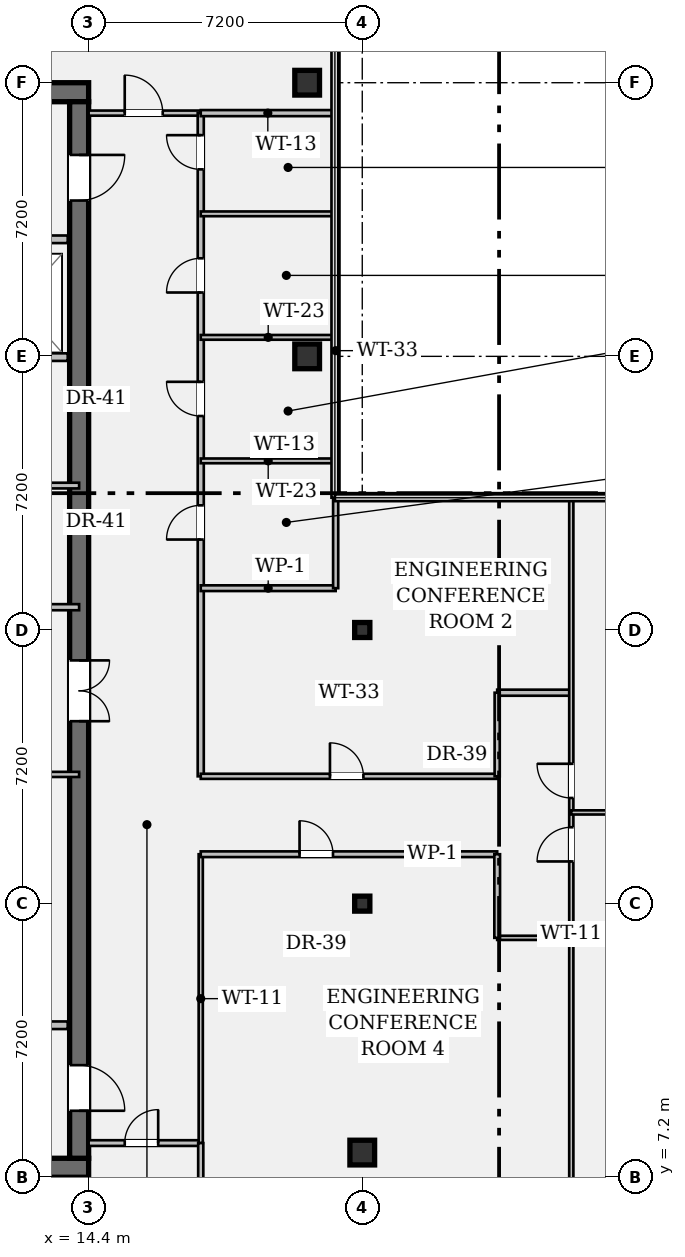
"""IFC4 building model, lengths in metres.
Left out: names, types, materials, properties, quantities, classifications, styles, units other than length and angle.
Written with IfcOpenShell. Run it as: python <this file> out.ifc"""

import sys

from ifc_helpers import new_model, si_unit, direction, frame, frame_2d, origin, origin_2d, place, context, subcontext, project, spatial, rectangle, hollow_rectangle, i_section, extrude, element, fill, save


model = new_model("IFC4")
c1 = context("Model", 3, precision=1e-05, world=origin(), true_north=direction((0.0, 1.0)))
c2 = subcontext(c1, "Body", "Model", "MODEL_VIEW")
j1 = project(units=[si_unit("LENGTHUNIT", "METRE"), si_unit("PLANEANGLEUNIT", "RADIAN")], contexts=[c1])
p1 = place(None, origin())
s1 = spatial("IfcSite", under=j1, at=p1, CompositionType="ELEMENT")
p2 = place(p1, origin())
s2 = spatial("IfcBuilding", under=s1, at=p2, CompositionType="ELEMENT")
p3 = place(p2, frame((0.0, 0.0, 283.15)))
s3 = spatial("IfcBuildingStorey", under=s2, at=p3, CompositionType="ELEMENT", Elevation=283.15)
for number, where, z_axis, x_axis in (
    (1, (0.5, 7.45, 0.0), (0.0, 0.0, 1.0), (1.0, 0.0, 0.0)),
    (2, (0.5, 35.75, 0.0), (0.0, 0.0, 1.0), (1.0, 0.0, 0.0)),
):
    element("IfcWall", number, at=place(p3, frame(where, z_axis=z_axis, x_axis=x_axis)), inside=s3, PredefinedType="SHEAR", context=c2, shape_type="SweptSolid", body=[
        extrude(rectangle(XDim=13.9, YDim=0.5, at=frame_2d((6.95, 0.0))), origin(), (0.0, 0.0, 1.0), 3.24),
    ])
p4 = place(p3, frame((14.15, 35.5, 0.0), z_axis=(0.0, 0.0, 1.0), x_axis=(0.0, -1.0, 0.0)))
e3 = element("IfcWall", 3, at=p4, inside=s3, PredefinedType="SHEAR", context=c2, shape_type="SweptSolid", body=[
    extrude(rectangle(XDim=27.8, YDim=0.5, at=frame_2d((13.9, 0.0))), origin(), (0.0, 0.0, 1.0), 3.24),
])
p5 = place(p4, frame((1.4, 0.0, 0.0)))
e4 = element("IfcOpeningElement", 4, at=p5, cuts=e3, PredefinedType="OPENING", context=c2, shape_type="SweptSolid", body=[
    extrude(rectangle(XDim=1.2, YDim=2.15, at=frame_2d((0.6, 1.075))), frame((0.0, 0.262, 0.0), z_axis=(0.0, -1.0, 0.0), x_axis=(1.0, 0.0, 0.0)), (0.0, 0.0, 1.0), 0.524),
])
p6 = place(p4, frame((25.35, 0.0, 0.0)))
e5 = element("IfcOpeningElement", 5, at=p6, cuts=e3, PredefinedType="OPENING", context=c2, shape_type="SweptSolid", body=[
    extrude(rectangle(XDim=1.2, YDim=2.15, at=frame_2d((0.6, 1.075))), frame((0.0, 0.262, 0.0), z_axis=(0.0, -1.0, 0.0), x_axis=(1.0, 0.0, 0.0)), (0.0, 0.0, 1.0), 0.524),
])
p7 = place(p4, frame((14.7, 0.0, 0.0)))
e6 = element("IfcOpeningElement", 6, at=p7, cuts=e3, PredefinedType="OPENING", context=c2, shape_type="SweptSolid", body=[
    extrude(rectangle(XDim=1.6, YDim=2.2, at=frame_2d((0.8, 1.1))), frame((0.0, 0.262, 0.0), z_axis=(0.0, -1.0, 0.0), x_axis=(1.0, 0.0, 0.0)), (0.0, 0.0, 1.0), 0.524),
])
for number, where, z_axis, x_axis in (
    (7, (20.15, 28.8, 0.0), (0.0, 0.0, 1.0), (1.0, 0.0, 0.0)),
    (8, (20.15, 36.0, 0.0), (0.0, 0.0, 1.0), (1.0, 0.0, 0.0)),
    (9, (21.6, 7.85, 0.0), (0.0, 0.0, 1.0), (1.0, 0.0, 0.0)),
):
    element("IfcColumn", number, at=place(p3, frame(where, z_axis=z_axis, x_axis=x_axis)), inside=s3, PredefinedType="COLUMN", context=c2, shape_type="SweptSolid", body=[
        extrude(hollow_rectangle(XDim=0.65, YDim=0.65, WallThickness=0.04, at=origin_2d()), origin(), (0.0, 0.0, 1.0), 3.24),
    ])
for number, where, z_axis, x_axis in (
    (10, (21.6, 14.4, 0.0), (0.0, 0.0, 1.0), (1.0, 0.0, 0.0)),
    (11, (21.6, 21.6, 0.0), (0.0, 0.0, 1.0), (1.0, 0.0, 0.0)),
):
    element("IfcColumn", number, at=place(p3, frame(where, z_axis=z_axis, x_axis=x_axis)), inside=s3, PredefinedType="COLUMN", context=c2, shape_type="SweptSolid", body=[
        extrude(i_section(OverallWidth=0.399, OverallDepth=0.394, WebThickness=0.023, FlangeThickness=0.037, FilletRadius=0.018, at=origin_2d()), origin(), (0.0, 0.0, 1.0), 3.24),
    ])
p8 = place(p3, frame((8.7, 31.88, 0.0), z_axis=(0.0, 0.0, 1.0), x_axis=(1.0, 0.0, 0.0)))
e12 = element("IfcWall", 12, at=p8, inside=s3, PredefinedType="PARTITIONING", context=c2, shape_type="SweptSolid", body=[
    extrude(rectangle(XDim=5.15, YDim=0.2, at=frame_2d((2.575, 0.0))), origin(), (0.0, 0.0, 1.0), 3.24),
])
p9 = place(p8, frame((0.75, 0.0, 0.0)))
e13 = element("IfcOpeningElement", 13, at=p9, cuts=e12, PredefinedType="OPENING", context=c2, shape_type="SweptSolid", body=[
    extrude(rectangle(XDim=1.2, YDim=2.2, at=frame_2d((0.6, 1.1))), frame((0.0, 0.112, 0.0), z_axis=(0.0, -1.0, 0.0), x_axis=(1.0, 0.0, 0.0)), (0.0, 0.0, 1.0), 0.224),
])
p10 = place(p8, frame((3.25, 0.0, 0.0)))
e14 = element("IfcOpeningElement", 14, at=p10, cuts=e12, PredefinedType="OPENING", context=c2, shape_type="SweptSolid", body=[
    extrude(rectangle(XDim=1.2, YDim=2.2, at=frame_2d((0.6, 1.1))), frame((0.0, 0.112, 0.0), z_axis=(0.0, -1.0, 0.0), x_axis=(1.0, 0.0, 0.0)), (0.0, 0.0, 1.0), 0.224),
])
for number, where, z_axis, x_axis in (
    (15, (8.7, 11.2, 0.0), (0.0, 0.0, 1.0), (1.0, 0.0, 0.0)),
    (16, (8.7, 28.78, 0.0), (0.0, 0.0, 1.0), (1.0, 0.0, 0.0)),
):
    element("IfcWall", number, at=place(p3, frame(where, z_axis=z_axis, x_axis=x_axis)), inside=s3, PredefinedType="PARTITIONING", context=c2, shape_type="SweptSolid", body=[
        extrude(rectangle(XDim=5.15, YDim=0.2, at=frame_2d((2.575, 0.0))), origin(), (0.0, 0.0, 1.0), 3.24),
    ])
p11 = place(p3, frame((7.1, 22.2, 0.0), z_axis=(0.0, 0.0, 1.0), x_axis=(1.0, 0.0, 0.0)))
e17 = element("IfcWall", 17, at=p11, inside=s3, PredefinedType="PARTITIONING", context=c2, shape_type="SweptSolid", body=[
    extrude(rectangle(XDim=7.05, YDim=0.16, at=frame_2d((3.525, 0.0))), origin(), (0.0, 0.0, 1.0), 3.24),
])
p12 = place(p3, frame((7.1, 25.4, 0.0), z_axis=(0.0, 0.0, 1.0), x_axis=(1.0, 0.0, 0.0)))
e18 = element("IfcWall", 18, at=p12, inside=s3, PredefinedType="PARTITIONING", context=c2, shape_type="SweptSolid", body=[
    extrude(rectangle(XDim=7.05, YDim=0.15, at=frame_2d((3.525, 0.0))), origin(), (0.0, 0.0, 1.0), 3.24),
])
p13 = place(p3, frame((5.15, 17.8, 0.0), z_axis=(0.0, 0.0, 1.0), x_axis=(1.0, 0.0, 0.0)))
e19 = element("IfcWall", 19, at=p13, inside=s3, PredefinedType="PARTITIONING", context=c2, shape_type="SweptSolid", body=[
    extrude(rectangle(XDim=9.0, YDim=0.135, at=frame_2d((4.5, 0.0))), origin(), (0.0, 0.0, 1.0), 3.24),
])
p14 = place(p13, frame((4.35, 0.0, 0.0)))
e20 = element("IfcOpeningElement", 20, at=p14, cuts=e19, PredefinedType="OPENING", context=c2, shape_type="SweptSolid", body=[
    extrude(rectangle(XDim=1.0, YDim=2.15, at=frame_2d((0.5, 1.075))), frame((0.0, 0.08, 0.0), z_axis=(0.0, -1.0, 0.0), x_axis=(1.0, 0.0, 0.0)), (0.0, 0.0, 1.0), 0.159),
])
p15 = place(p3, frame((14.4, 8.1, 0.0), z_axis=(0.0, 0.0, 1.0), x_axis=(1.0, 0.0, 0.0)))
e21 = element("IfcWall", 21, at=p15, inside=s3, PredefinedType="PARTITIONING", context=c2, shape_type="SweptSolid", body=[
    extrude(rectangle(XDim=2.95, YDim=0.15, at=frame_2d((1.475, 0.0))), origin(), (0.0, 0.0, 1.0), 3.24),
])
p16 = place(p15, frame((0.95, 0.0, 0.0)))
e22 = element("IfcOpeningElement", 22, at=p16, cuts=e21, PredefinedType="OPENING", context=c2, shape_type="SweptSolid", body=[
    extrude(rectangle(XDim=0.88, YDim=2.15, at=frame_2d((0.44, 1.075))), frame((0.0, 0.087, 0.0), z_axis=(0.0, -1.0, 0.0), x_axis=(1.0, 0.0, 0.0)), (0.0, 0.0, 1.0), 0.174),
])
p17 = place(p3, frame((14.4, 35.2, 0.0), z_axis=(0.0, 0.0, 1.0), x_axis=(1.0, 0.0, 0.0)))
e23 = element("IfcWall", 23, at=p17, inside=s3, PredefinedType="PARTITIONING", context=c2, shape_type="SweptSolid", body=[
    extrude(rectangle(XDim=2.95, YDim=0.135, at=frame_2d((1.475, 0.0))), origin(), (0.0, 0.0, 1.0), 2.808),
])
p18 = place(p17, frame((0.95, 0.0, 0.0)))
e24 = element("IfcOpeningElement", 24, at=p18, cuts=e23, PredefinedType="OPENING", context=c2, shape_type="SweptSolid", body=[
    extrude(rectangle(XDim=1.0, YDim=2.15, at=frame_2d((0.5, 1.075))), frame((0.0, 0.08, 0.0), z_axis=(0.0, -1.0, 0.0), x_axis=(1.0, 0.0, 0.0)), (0.0, 0.0, 1.0), 0.159),
])
p19 = place(p3, frame((17.35, 8.1, 0.0), z_axis=(0.0, 0.0, 1.0), x_axis=(0.0, 1.0, 0.0)))
e25 = element("IfcWall", 25, at=p19, inside=s3, PredefinedType="PARTITIONING", context=c2, shape_type="SweptSolid", body=[
    extrude(rectangle(XDim=7.6, YDim=0.11, at=frame_2d((3.8, 0.0))), origin(), (0.0, 0.0, 1.0), 2.676),
])
p20 = place(p3, frame((17.35, 17.75, 0.0), z_axis=(0.0, 0.0, 1.0), x_axis=(0.0, 1.0, 0.0)))
e26 = element("IfcWall", 26, at=p20, inside=s3, PredefinedType="PARTITIONING", context=c2, shape_type="SweptSolid", body=[
    extrude(rectangle(XDim=17.45, YDim=0.16, at=frame_2d((8.725, 0.0))), origin(), (0.0, 0.0, 1.0), 2.676),
])
p21 = place(p20, frame((6.23, 0.0, 0.0)))
e27 = element("IfcOpeningElement", 27, at=p21, cuts=e26, PredefinedType="OPENING", context=c2, shape_type="SweptSolid", body=[
    extrude(rectangle(XDim=0.9, YDim=2.15, at=frame_2d((0.45, 1.075))), frame((0.0, 0.092, 0.0), z_axis=(0.0, -1.0, 0.0), x_axis=(1.0, 0.0, 0.0)), (0.0, 0.0, 1.0), 0.184),
])
p22 = place(p20, frame((9.48, 0.0, 0.0)))
e28 = element("IfcOpeningElement", 28, at=p22, cuts=e26, PredefinedType="OPENING", context=c2, shape_type="SweptSolid", body=[
    extrude(rectangle(XDim=0.9, YDim=2.15, at=frame_2d((0.45, 1.075))), frame((0.0, 0.092, 0.0), z_axis=(0.0, -1.0, 0.0), x_axis=(1.0, 0.0, 0.0)), (0.0, 0.0, 1.0), 0.184),
])
p23 = place(p20, frame((12.73, 0.0, 0.0)))
e29 = element("IfcOpeningElement", 29, at=p23, cuts=e26, PredefinedType="OPENING", context=c2, shape_type="SweptSolid", body=[
    extrude(rectangle(XDim=0.9, YDim=2.15, at=frame_2d((0.45, 1.075))), frame((0.0, 0.092, 0.0), z_axis=(0.0, -1.0, 0.0), x_axis=(1.0, 0.0, 0.0)), (0.0, 0.0, 1.0), 0.184),
])
p24 = place(p20, frame((15.97, 0.0, 0.0)))
e30 = element("IfcOpeningElement", 30, at=p24, cuts=e26, PredefinedType="OPENING", context=c2, shape_type="SweptSolid", body=[
    extrude(rectangle(XDim=0.9, YDim=2.15, at=frame_2d((0.45, 1.075))), frame((0.0, 0.092, 0.0), z_axis=(0.0, -1.0, 0.0), x_axis=(1.0, 0.0, 0.0)), (0.0, 0.0, 1.0), 0.184),
])
p25 = place(p3, frame((17.35, 15.7, 0.0), z_axis=(0.0, 0.0, 1.0), x_axis=(1.0, 0.0, 0.0)))
e31 = element("IfcWall", 31, at=p25, inside=s3, PredefinedType="PARTITIONING", context=c2, shape_type="SweptSolid", body=[
    extrude(rectangle(XDim=7.8, YDim=0.15, at=frame_2d((3.9, 0.0))), origin(), (0.0, 0.0, 1.0), 2.676),
])
p26 = place(p25, frame((2.6, 0.0, 0.0)))
e32 = element("IfcOpeningElement", 32, at=p26, cuts=e31, PredefinedType="OPENING", context=c2, shape_type="SweptSolid", body=[
    extrude(rectangle(XDim=0.88, YDim=2.15, at=frame_2d((0.44, 1.075))), frame((0.0, 0.087, 0.0), z_axis=(0.0, -1.0, 0.0), x_axis=(1.0, 0.0, 0.0)), (0.0, 0.0, 1.0), 0.174),
])
p27 = place(p3, frame((17.35, 17.75, 0.0), z_axis=(0.0, 0.0, 1.0), x_axis=(1.0, 0.0, 0.0)))
e33 = element("IfcWall", 33, at=p27, inside=s3, PredefinedType="PARTITIONING", context=c2, shape_type="SweptSolid", body=[
    extrude(rectangle(XDim=7.8, YDim=0.135, at=frame_2d((3.9, 0.0))), origin(), (0.0, 0.0, 1.0), 2.676),
])
p28 = place(p27, frame((3.4, 0.0, 0.0)))
e34 = element("IfcOpeningElement", 34, at=p28, cuts=e33, PredefinedType="OPENING", context=c2, shape_type="SweptSolid", body=[
    extrude(rectangle(XDim=0.88, YDim=2.15, at=frame_2d((0.44, 1.075))), frame((0.0, 0.08, 0.0), z_axis=(0.0, -1.0, 0.0), x_axis=(1.0, 0.0, 0.0)), (0.0, 0.0, 1.0), 0.159),
])
p29 = place(p3, frame((25.15, 13.5, 0.0), z_axis=(0.0, 0.0, 1.0), x_axis=(1.0, 0.0, 0.0)))
e35 = element("IfcWall", 35, at=p29, inside=s3, PredefinedType="PARTITIONING", context=c2, shape_type="SweptSolid", body=[
    extrude(rectangle(XDim=1.95, YDim=0.11, at=frame_2d((0.975, 0.0))), origin(), (0.0, 0.0, 1.0), 2.808),
])
p30 = place(p3, frame((25.15, 19.95, 0.0), z_axis=(0.0, 0.0, 1.0), x_axis=(1.0, 0.0, 0.0)))
e36 = element("IfcWall", 36, at=p30, inside=s3, PredefinedType="PARTITIONING", context=c2, shape_type="SweptSolid", body=[
    extrude(rectangle(XDim=1.95, YDim=0.16, at=frame_2d((0.975, 0.0))), origin(), (0.0, 0.0, 1.0), 2.808),
])
p31 = place(p3, frame((25.15, 13.5, 0.0), z_axis=(0.0, 0.0, 1.0), x_axis=(0.0, 1.0, 0.0)))
e37 = element("IfcWall", 37, at=p31, inside=s3, PredefinedType="PARTITIONING", context=c2, shape_type="SweptSolid", body=[
    extrude(rectangle(XDim=2.2, YDim=0.15, at=frame_2d((1.1, 0.0))), origin(), (0.0, 0.0, 1.0), 2.676),
])
p32 = place(p3, frame((25.15, 17.75, 0.0), z_axis=(0.0, 0.0, 1.0), x_axis=(0.0, 1.0, 0.0)))
e38 = element("IfcWall", 38, at=p32, inside=s3, PredefinedType="PARTITIONING", context=c2, shape_type="SweptSolid", body=[
    extrude(rectangle(XDim=2.2, YDim=0.135, at=frame_2d((1.1, 0.0))), origin(), (0.0, 0.0, 1.0), 3.24),
])
p33 = place(p3, frame((27.1, 6.52, 0.0), z_axis=(0.0, 0.0, 1.0), x_axis=(0.0, 1.0, 0.0)))
e39 = element("IfcWall", 39, at=p33, inside=s3, PredefinedType="PARTITIONING", context=c2, shape_type="SweptSolid", body=[
    extrude(rectangle(XDim=18.56, YDim=0.11, at=frame_2d((9.28, 0.0))), origin(), (0.0, 0.0, 1.0), 2.676),
])
p34 = place(p33, frame((8.99, 0.0, 0.0)))
e40 = element("IfcOpeningElement", 40, at=p34, cuts=e39, PredefinedType="OPENING", context=c2, shape_type="SweptSolid", body=[
    extrude(rectangle(XDim=0.9, YDim=2.15, at=frame_2d((0.45, 1.075))), frame((0.0, 0.067, 0.0), z_axis=(0.0, -1.0, 0.0), x_axis=(1.0, 0.0, 0.0)), (0.0, 0.0, 1.0), 0.134),
])
p35 = place(p33, frame((10.66, 0.0, 0.0)))
e41 = element("IfcOpeningElement", 41, at=p35, cuts=e39, PredefinedType="OPENING", context=c2, shape_type="SweptSolid", body=[
    extrude(rectangle(XDim=0.9, YDim=2.15, at=frame_2d((0.45, 1.075))), frame((0.0, 0.067, 0.0), z_axis=(0.0, -1.0, 0.0), x_axis=(1.0, 0.0, 0.0)), (0.0, 0.0, 1.0), 0.134),
])
p36 = place(p3, frame((17.35, 35.2, 0.0), z_axis=(0.0, 0.0, 1.0), x_axis=(1.0, 0.0, 0.0)))
e42 = element("IfcWall", 42, at=p36, inside=s3, PredefinedType="PARTITIONING", context=c2, shape_type="SweptSolid", body=[
    extrude(rectangle(XDim=3.53, YDim=0.16, at=frame_2d((1.765, 0.0))), origin(), (0.0, 0.0, 1.0), 2.808),
])
p37 = place(p3, frame((17.35, 22.7, 0.0), z_axis=(0.0, 0.0, 1.0), x_axis=(1.0, 0.0, 0.0)))
e43 = element("IfcWall", 43, at=p37, inside=s3, PredefinedType="PARTITIONING", context=c2, shape_type="SweptSolid", body=[
    extrude(rectangle(XDim=3.55, YDim=0.15, at=frame_2d((1.775, 0.0))), origin(), (0.0, 0.0, 1.0), 2.808),
])
p38 = place(p3, frame((20.9, 22.7, 0.0), z_axis=(0.0, 0.0, 1.0), x_axis=(0.0, 1.0, 0.0)))
e44 = element("IfcWall", 44, at=p38, inside=s3, PredefinedType="PARTITIONING", context=c2, shape_type="SweptSolid", body=[
    extrude(rectangle(XDim=12.5, YDim=0.135, at=frame_2d((6.25, 0.0))), origin(), (0.0, 0.0, 1.0), 3.24),
])
for number, where, z_axis, x_axis in (
    (45, (17.35, 26.05, 0.0), (0.0, 0.0, 1.0), (1.0, 0.0, 0.0)),
    (46, (17.35, 29.3, 0.0), (0.0, 0.0, 1.0), (1.0, 0.0, 0.0)),
    (47, (17.35, 32.55, 0.0), (0.0, 0.0, 1.0), (1.0, 0.0, 0.0)),
):
    element("IfcWall", number, at=place(p3, frame(where, z_axis=z_axis, x_axis=x_axis)), inside=s3, PredefinedType="PARTITIONING", context=c2, shape_type="SweptSolid", body=[
        extrude(rectangle(XDim=3.55, YDim=0.125, at=frame_2d((1.775, 0.0))), origin(), (0.0, 0.0, 1.0), 2.808),
    ])
p39 = place(p3, frame((17.35, 6.52, 0.0), z_axis=(0.0, 0.0, 1.0), x_axis=(0.0, 1.0, 0.0)))
e48 = element("IfcWall", 48, at=p39, inside=s3, PredefinedType="PARTITIONING", context=c2, shape_type="SweptSolid", body=[
    extrude(rectangle(XDim=1.58, YDim=0.135, at=frame_2d((0.79, 0.0))), origin(), (0.0, 0.0, 1.0), 3.24),
])
p40 = place(p3, frame((27.1, 16.8, 0.0), z_axis=(0.0, 0.0, 1.0), x_axis=(1.0, 0.0, 0.0)))
e49 = element("IfcWall", 49, at=p40, inside=s3, PredefinedType="PARTITIONING", context=c2, shape_type="SweptSolid", body=[
    extrude(rectangle(XDim=18.38, YDim=0.11, at=frame_2d((9.19, 0.0))), origin(), (0.0, 0.0, 1.0), 2.676),
])
p41 = place(p5, origin())
e50 = element("IfcDoor", 50, at=p41, inside=s3, OperationType="SINGLE_SWING_LEFT", PredefinedType="DOOR", context=c2, shape_type="SweptSolid", body=[
    extrude(rectangle(XDim=1.2, YDim=2.15, at=frame_2d((0.6, 1.075))), frame((0.0, 0.025, 0.0), z_axis=(0.0, -1.0, 0.0), x_axis=(1.0, 0.0, 0.0)), (0.0, 0.0, 1.0), 0.05),
])
fill(e4, e50)
p42 = place(p6, origin())
e51 = element("IfcDoor", 51, at=p42, inside=s3, OperationType="SINGLE_SWING_RIGHT", PredefinedType="DOOR", context=c2, shape_type="SweptSolid", body=[
    extrude(rectangle(XDim=1.2, YDim=2.15, at=frame_2d((0.6, 1.075))), frame((0.0, 0.025, 0.0), z_axis=(0.0, -1.0, 0.0), x_axis=(1.0, 0.0, 0.0)), (0.0, 0.0, 1.0), 0.05),
])
fill(e5, e51)
p43 = place(p7, origin())
e52 = element("IfcDoor", 52, at=p43, inside=s3, OperationType="DOUBLE_DOOR_SINGLE_SWING", PredefinedType="DOOR", context=c2, shape_type="SweptSolid", body=[
    extrude(rectangle(XDim=1.6, YDim=2.2, at=frame_2d((0.8, 1.1))), frame((0.0, 0.025, 0.0), z_axis=(0.0, -1.0, 0.0), x_axis=(1.0, 0.0, 0.0)), (0.0, 0.0, 1.0), 0.05),
])
fill(e6, e52)
p44 = place(p18, origin())
e53 = element("IfcDoor", 53, at=p44, inside=s3, OperationType="SINGLE_SWING_LEFT", PredefinedType="DOOR", context=c2, shape_type="SweptSolid", body=[
    extrude(rectangle(XDim=1.0, YDim=2.15, at=frame_2d((0.5, 1.075))), frame((0.0, 0.025, 0.0), z_axis=(0.0, -1.0, 0.0), x_axis=(1.0, 0.0, 0.0)), (0.0, 0.0, 1.0), 0.05),
])
fill(e24, e53)
p45 = place(p21, origin())
e54 = element("IfcDoor", 54, at=p45, inside=s3, OperationType="SINGLE_SWING_LEFT", PredefinedType="DOOR", context=c2, shape_type="SweptSolid", body=[
    extrude(rectangle(XDim=0.9, YDim=2.15, at=frame_2d((0.45, 1.075))), frame((0.0, 0.025, 0.0), z_axis=(0.0, -1.0, 0.0), x_axis=(1.0, 0.0, 0.0)), (0.0, 0.0, 1.0), 0.05),
])
fill(e27, e54)
p46 = place(p22, origin())
e55 = element("IfcDoor", 55, at=p46, inside=s3, OperationType="SINGLE_SWING_RIGHT", PredefinedType="DOOR", context=c2, shape_type="SweptSolid", body=[
    extrude(rectangle(XDim=0.9, YDim=2.15, at=frame_2d((0.45, 1.075))), frame((0.0, 0.025, 0.0), z_axis=(0.0, -1.0, 0.0), x_axis=(1.0, 0.0, 0.0)), (0.0, 0.0, 1.0), 0.05),
])
fill(e28, e55)
p47 = place(p23, origin())
e56 = element("IfcDoor", 56, at=p47, inside=s3, OperationType="SINGLE_SWING_LEFT", PredefinedType="DOOR", context=c2, shape_type="SweptSolid", body=[
    extrude(rectangle(XDim=0.9, YDim=2.15, at=frame_2d((0.45, 1.075))), frame((0.0, 0.025, 0.0), z_axis=(0.0, -1.0, 0.0), x_axis=(1.0, 0.0, 0.0)), (0.0, 0.0, 1.0), 0.05),
])
fill(e29, e56)
p48 = place(p24, origin())
e57 = element("IfcDoor", 57, at=p48, inside=s3, OperationType="SINGLE_SWING_RIGHT", PredefinedType="DOOR", context=c2, shape_type="SweptSolid", body=[
    extrude(rectangle(XDim=0.9, YDim=2.15, at=frame_2d((0.45, 1.075))), frame((0.0, 0.025, 0.0), z_axis=(0.0, -1.0, 0.0), x_axis=(1.0, 0.0, 0.0)), (0.0, 0.0, 1.0), 0.05),
])
fill(e30, e57)
p49 = place(p28, origin())
e58 = element("IfcDoor", 58, at=p49, inside=s3, OperationType="SINGLE_SWING_LEFT", PredefinedType="DOOR", context=c2, shape_type="SweptSolid", body=[
    extrude(rectangle(XDim=0.88, YDim=2.15, at=frame_2d((0.44, 1.075))), frame((0.0, 0.025, 0.0), z_axis=(0.0, -1.0, 0.0), x_axis=(1.0, 0.0, 0.0)), (0.0, 0.0, 1.0), 0.05),
])
fill(e34, e58)
p50 = place(p16, origin())
e59 = element("IfcDoor", 59, at=p50, inside=s3, OperationType="SINGLE_SWING_RIGHT", PredefinedType="DOOR", context=c2, shape_type="SweptSolid", body=[
    extrude(rectangle(XDim=0.88, YDim=2.15, at=frame_2d((0.44, 1.075))), frame((0.0, 0.025, 0.0), z_axis=(0.0, -1.0, 0.0), x_axis=(1.0, 0.0, 0.0)), (0.0, 0.0, 1.0), 0.05),
])
fill(e22, e59)
p51 = place(p26, origin())
e60 = element("IfcDoor", 60, at=p51, inside=s3, OperationType="SINGLE_SWING_LEFT", PredefinedType="DOOR", context=c2, shape_type="SweptSolid", body=[
    extrude(rectangle(XDim=0.88, YDim=2.15, at=frame_2d((0.44, 1.075))), frame((0.0, 0.025, 0.0), z_axis=(0.0, -1.0, 0.0), x_axis=(1.0, 0.0, 0.0)), (0.0, 0.0, 1.0), 0.05),
])
fill(e32, e60)
p52 = place(p34, origin())
e61 = element("IfcDoor", 61, at=p52, inside=s3, OperationType="SINGLE_SWING_LEFT", PredefinedType="DOOR", context=c2, shape_type="SweptSolid", body=[
    extrude(rectangle(XDim=0.9, YDim=2.15, at=frame_2d((0.45, 1.075))), frame((0.0, 0.025, 0.0), z_axis=(0.0, -1.0, 0.0), x_axis=(1.0, 0.0, 0.0)), (0.0, 0.0, 1.0), 0.05),
])
fill(e40, e61)
p53 = place(p35, origin())
e62 = element("IfcDoor", 62, at=p53, inside=s3, OperationType="SINGLE_SWING_RIGHT", PredefinedType="DOOR", context=c2, shape_type="SweptSolid", body=[
    extrude(rectangle(XDim=0.9, YDim=2.15, at=frame_2d((0.45, 1.075))), frame((0.0, 0.025, 0.0), z_axis=(0.0, -1.0, 0.0), x_axis=(1.0, 0.0, 0.0)), (0.0, 0.0, 1.0), 0.05),
])
fill(e41, e62)
save(model, sys.argv[1])
